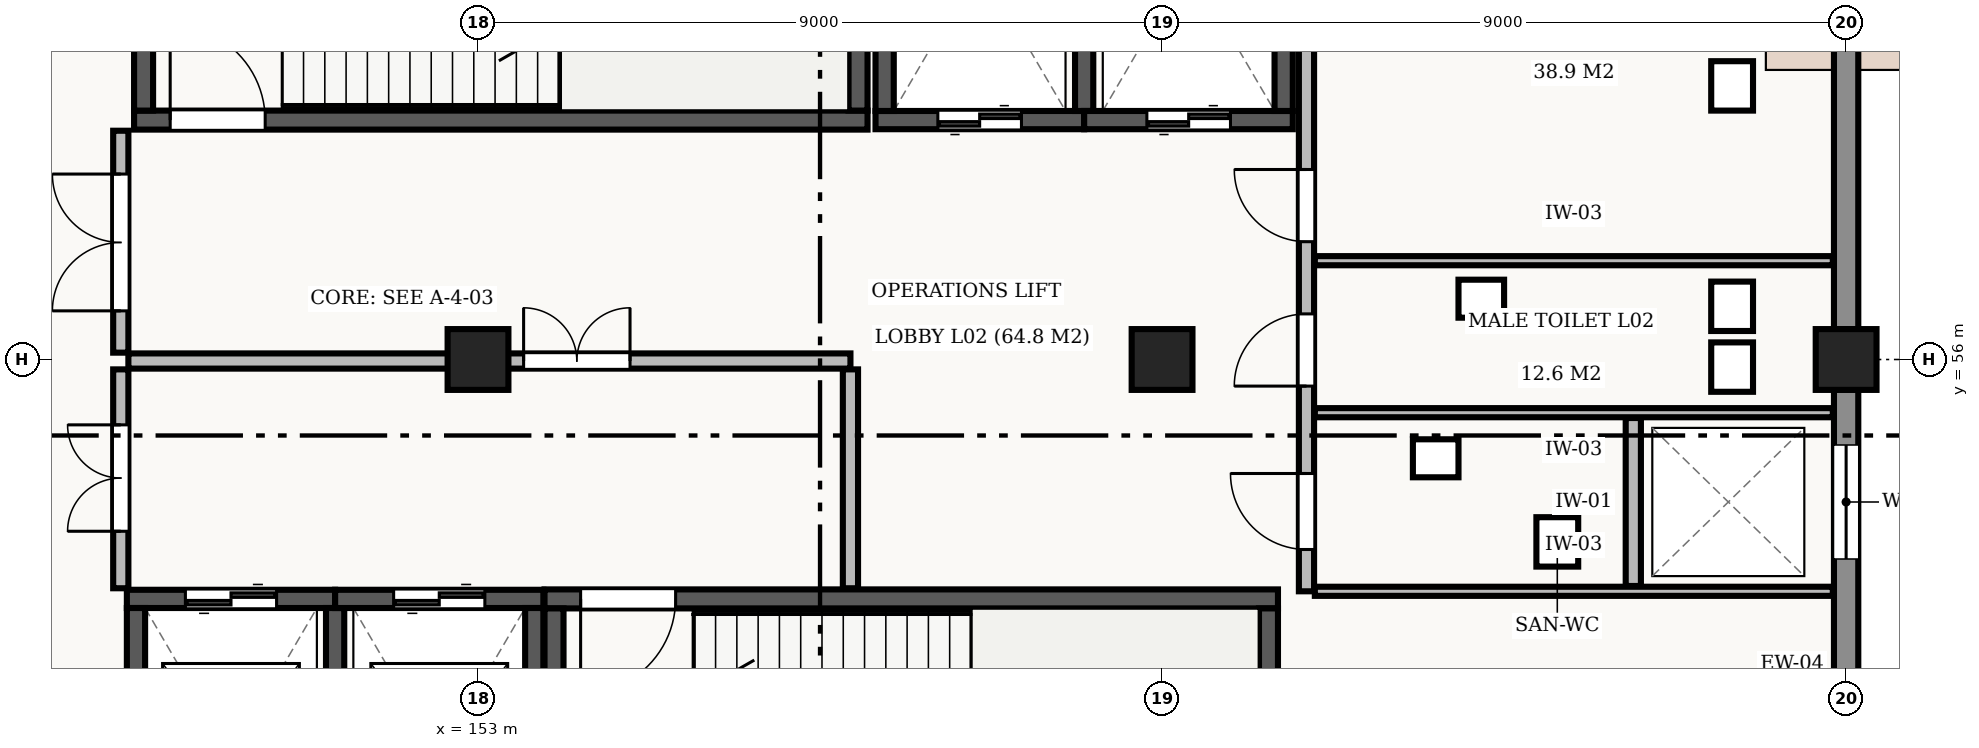
"""IFC4 building model, lengths in metres.
Left out: names, types, materials, properties, quantities, classifications, styles, units other than length and angle.
Written with IfcOpenShell. Run it as: python <this file> out.ifc"""

import sys

from ifc_helpers import new_model, si_unit, direction, frame, frame_2d, origin, origin_2d, place, context, subcontext, project, spatial, rectangle, extrude, element, fill, save


model = new_model("IFC4")
c1 = context("Model", 3, precision=1e-05, world=origin(), true_north=direction((0.0, 1.0)))
c2 = subcontext(c1, "Body", "Model", "MODEL_VIEW")
j1 = project(units=[si_unit("LENGTHUNIT", "METRE"), si_unit("PLANEANGLEUNIT", "RADIAN")], contexts=[c1])
p1 = place(None, origin())
s1 = spatial("IfcSite", under=j1, at=p1, CompositionType="ELEMENT")
p2 = place(p1, origin())
s2 = spatial("IfcBuilding", under=s1, at=p2, CompositionType="ELEMENT")
p3 = place(p2, frame((0.0, 0.0, 10.2)))
s3 = spatial("IfcBuildingStorey", under=s2, at=p3, CompositionType="ELEMENT", Elevation=10.2)
for number, where, z_axis, x_axis in (
    (1, (153.0, 56.0, 0.0), (0.0, 0.0, 1.0), (1.0, 0.0, 0.0)),
    (2, (162.0, 56.0, 0.0), (0.0, 0.0, 1.0), (1.0, 0.0, 0.0)),
    (3, (171.0, 56.0, 0.0), (0.0, 0.0, 1.0), (1.0, 0.0, 0.0)),
):
    element("IfcColumn", number, at=place(p3, frame(where, z_axis=z_axis, x_axis=x_axis)), inside=s3, PredefinedType="COLUMN", context=c2, shape_type="SweptSolid", body=[
        extrude(rectangle(XDim=0.8, YDim=0.8, at=origin_2d()), origin(), (0.0, 0.0, 1.0), 4.2),
    ])
p4 = place(p3, frame((171.0, 63.602, 0.0), z_axis=(0.0, 0.0, 1.0), x_axis=(0.0, -1.0, 0.0)))
e4 = element("IfcWall", 4, at=p4, inside=s3, PredefinedType="STANDARD", context=c2, shape_type="SweptSolid", body=[
    extrude(rectangle(XDim=7.204, YDim=0.32, at=frame_2d((3.602, 0.0))), origin(), (0.0, 0.0, 1.0), 3.32),
])
p5 = place(p4, frame((0.668, 0.0, 0.9)))
e5 = element("IfcOpeningElement", 5, at=p5, cuts=e4, PredefinedType="OPENING", context=c2, shape_type="SweptSolid", body=[
    extrude(rectangle(XDim=2.6, YDim=1.6, at=frame_2d((1.3, 0.8))), frame((0.0, 0.172, 0.0), z_axis=(0.0, -1.0, 0.0), x_axis=(1.0, 0.0, 0.0)), (0.0, 0.0, 1.0), 0.344),
])
p6 = place(p3, frame((171.0, 55.602, 0.0), z_axis=(0.0, 0.0, 1.0), x_axis=(0.0, -1.0, 0.0)))
e6 = element("IfcWall", 6, at=p6, inside=s3, PredefinedType="STANDARD", context=c2, shape_type="SweptSolid", body=[
    extrude(rectangle(XDim=7.204, YDim=0.32, at=frame_2d((3.602, 0.0))), origin(), (0.0, 0.0, 1.0), 3.32),
])
p7 = place(p6, frame((0.727, 0.0, 0.9)))
e7 = element("IfcOpeningElement", 7, at=p7, cuts=e6, PredefinedType="OPENING", context=c2, shape_type="SweptSolid", body=[
    extrude(rectangle(XDim=1.5, YDim=2.1, at=frame_2d((0.75, 1.05))), frame((0.0, 0.172, 0.0), z_axis=(0.0, -1.0, 0.0), x_axis=(1.0, 0.0, 0.0)), (0.0, 0.0, 1.0), 0.344),
])
p8 = place(p6, frame((4.303, 0.0, 0.9)))
e8 = element("IfcOpeningElement", 8, at=p8, cuts=e6, PredefinedType="OPENING", context=c2, shape_type="SweptSolid", body=[
    extrude(rectangle(XDim=1.5, YDim=2.1, at=frame_2d((0.75, 1.05))), frame((0.0, 0.172, 0.0), z_axis=(0.0, -1.0, 0.0), x_axis=(1.0, 0.0, 0.0)), (0.0, 0.0, 1.0), 0.344),
])
p9 = place(p3, frame((148.475, 59.15, 0.0), z_axis=(0.0, 0.0, 1.0), x_axis=(1.0, 0.0, 0.0)))
e9 = element("IfcWall", 9, at=p9, inside=s3, PredefinedType="SHEAR", context=c2, shape_type="SweptSolid", body=[
    extrude(rectangle(XDim=9.65, YDim=0.25, at=frame_2d((4.825, 0.0))), origin(), (0.0, 0.0, 1.0), 3.89),
])
p10 = place(p9, frame((0.475, 0.0, 0.0)))
e10 = element("IfcOpeningElement", 10, at=p10, cuts=e9, PredefinedType="OPENING", context=c2, shape_type="SweptSolid", body=[
    extrude(rectangle(XDim=1.25, YDim=2.15, at=frame_2d((0.625, 1.075))), frame((0.0, 0.137, 0.0), z_axis=(0.0, -1.0, 0.0), x_axis=(1.0, 0.0, 0.0)), (0.0, 0.0, 1.0), 0.274),
])
for number, where, z_axis, x_axis in (
    (11, (148.6, 63.125, 0.0), (0.0, 0.0, 1.0), (0.0, -1.0, 0.0)),
    (12, (158.0, 59.275, 0.0), (0.0, 0.0, 1.0), (0.0, 1.0, 0.0)),
):
    element("IfcWall", number, at=place(p3, frame(where, z_axis=z_axis, x_axis=x_axis)), inside=s3, PredefinedType="SHEAR", context=c2, shape_type="SweptSolid", body=[
        extrude(rectangle(XDim=3.85, YDim=0.25, at=frame_2d((1.925, 0.0))), origin(), (0.0, 0.0, 1.0), 3.89),
    ])
p11 = place(p3, frame((163.525, 52.85, 0.0), z_axis=(0.0, 0.0, 1.0), x_axis=(-1.0, 0.0, 0.0)))
e13 = element("IfcWall", 13, at=p11, inside=s3, PredefinedType="SHEAR", context=c2, shape_type="SweptSolid", body=[
    extrude(rectangle(XDim=9.65, YDim=0.25, at=frame_2d((4.825, 0.0))), origin(), (0.0, 0.0, 1.0), 3.89),
])
p12 = place(p11, frame((7.925, 0.0, 0.0)))
e14 = element("IfcOpeningElement", 14, at=p12, cuts=e13, PredefinedType="OPENING", context=c2, shape_type="SweptSolid", body=[
    extrude(rectangle(XDim=1.25, YDim=2.15, at=frame_2d((0.625, 1.075))), frame((0.0, 0.137, 0.0), z_axis=(0.0, -1.0, 0.0), x_axis=(1.0, 0.0, 0.0)), (0.0, 0.0, 1.0), 0.274),
])
for number, where, z_axis, x_axis in (
    (15, (154.0, 52.725, 0.0), (0.0, 0.0, 1.0), (0.0, -1.0, 0.0)),
    (16, (163.4, 48.875, 0.0), (0.0, 0.0, 1.0), (0.0, 1.0, 0.0)),
):
    element("IfcWall", number, at=place(p3, frame(where, z_axis=z_axis, x_axis=x_axis)), inside=s3, PredefinedType="SHEAR", context=c2, shape_type="SweptSolid", body=[
        extrude(rectangle(XDim=3.85, YDim=0.25, at=frame_2d((1.925, 0.0))), origin(), (0.0, 0.0, 1.0), 3.89),
    ])
p13 = place(p3, frame((158.23, 59.15, 0.0), z_axis=(0.0, 0.0, 1.0), x_axis=(1.0, 0.0, 0.0)))
e17 = element("IfcWall", 17, at=p13, inside=s3, PredefinedType="SHEAR", context=c2, shape_type="SweptSolid", body=[
    extrude(rectangle(XDim=2.745, YDim=0.24, at=frame_2d((1.373, 0.0))), origin(), (0.0, 0.0, 1.0), 3.89),
])
p14 = place(p13, frame((0.82, 0.0, 0.0)))
e18 = element("IfcOpeningElement", 18, at=p14, cuts=e17, PredefinedType="OPENING", context=c2, shape_type="SweptSolid", body=[
    extrude(rectangle(XDim=1.1, YDim=2.2, at=frame_2d((0.55, 1.1))), frame((0.0, 0.132, 0.0), z_axis=(0.0, -1.0, 0.0), x_axis=(1.0, 0.0, 0.0)), (0.0, 0.0, 1.0), 0.264),
])
for number, where, z_axis, x_axis in (
    (19, (158.35, 63.13, 0.0), (0.0, 0.0, 1.0), (0.0, -1.0, 0.0)),
    (20, (160.975, 59.27, 0.0), (0.0, 0.0, 1.0), (0.0, 1.0, 0.0)),
):
    element("IfcWall", number, at=place(p3, frame(where, z_axis=z_axis, x_axis=x_axis)), inside=s3, PredefinedType="SHEAR", context=c2, shape_type="SweptSolid", body=[
        extrude(rectangle(XDim=3.86, YDim=0.24, at=frame_2d((1.93, 0.0))), origin(), (0.0, 0.0, 1.0), 3.89),
    ])
p15 = place(p3, frame((160.975, 59.15, 0.0), z_axis=(0.0, 0.0, 1.0), x_axis=(1.0, 0.0, 0.0)))
e21 = element("IfcWall", 21, at=p15, inside=s3, PredefinedType="SHEAR", context=c2, shape_type="SweptSolid", body=[
    extrude(rectangle(XDim=2.745, YDim=0.24, at=frame_2d((1.373, 0.0))), origin(), (0.0, 0.0, 1.0), 3.89),
])
p16 = place(p15, frame((0.825, 0.0, 0.0)))
e22 = element("IfcOpeningElement", 22, at=p16, cuts=e21, PredefinedType="OPENING", context=c2, shape_type="SweptSolid", body=[
    extrude(rectangle(XDim=1.1, YDim=2.2, at=frame_2d((0.55, 1.1))), frame((0.0, 0.132, 0.0), z_axis=(0.0, -1.0, 0.0), x_axis=(1.0, 0.0, 0.0)), (0.0, 0.0, 1.0), 0.264),
])
p17 = place(p3, frame((163.6, 59.27, 0.0), z_axis=(0.0, 0.0, 1.0), x_axis=(0.0, 1.0, 0.0)))
e23 = element("IfcWall", 23, at=p17, inside=s3, PredefinedType="SHEAR", context=c2, shape_type="SweptSolid", body=[
    extrude(rectangle(XDim=3.86, YDim=0.24, at=frame_2d((1.93, 0.0))), origin(), (0.0, 0.0, 1.0), 3.89),
])
p18 = place(p3, frame((151.12, 52.85, 0.0), z_axis=(0.0, 0.0, 1.0), x_axis=(-1.0, 0.0, 0.0)))
e24 = element("IfcWall", 24, at=p18, inside=s3, PredefinedType="SHEAR", context=c2, shape_type="SweptSolid", body=[
    extrude(rectangle(XDim=2.74, YDim=0.24, at=frame_2d((1.37, 0.0))), origin(), (0.0, 0.0, 1.0), 3.89),
])
p19 = place(p18, frame((0.77, 0.0, 0.0)))
e25 = element("IfcOpeningElement", 25, at=p19, cuts=e24, PredefinedType="OPENING", context=c2, shape_type="SweptSolid", body=[
    extrude(rectangle(XDim=1.2, YDim=2.2, at=frame_2d((0.6, 1.1))), frame((0.0, 0.132, 0.0), z_axis=(0.0, -1.0, 0.0), x_axis=(1.0, 0.0, 0.0)), (0.0, 0.0, 1.0), 0.264),
])
for number, where, z_axis, x_axis in (
    (26, (148.5, 52.73, 0.0), (0.0, 0.0, 1.0), (0.0, -1.0, 0.0)),
    (27, (151.12, 48.87, 0.0), (0.0, 0.0, 1.0), (0.0, 1.0, 0.0)),
):
    element("IfcWall", number, at=place(p3, frame(where, z_axis=z_axis, x_axis=x_axis)), inside=s3, PredefinedType="SHEAR", context=c2, shape_type="SweptSolid", body=[
        extrude(rectangle(XDim=3.86, YDim=0.24, at=frame_2d((1.93, 0.0))), origin(), (0.0, 0.0, 1.0), 3.89),
    ])
p20 = place(p3, frame((153.86, 52.85, 0.0), z_axis=(0.0, 0.0, 1.0), x_axis=(-1.0, 0.0, 0.0)))
e28 = element("IfcWall", 28, at=p20, inside=s3, PredefinedType="SHEAR", context=c2, shape_type="SweptSolid", body=[
    extrude(rectangle(XDim=2.74, YDim=0.24, at=frame_2d((1.37, 0.0))), origin(), (0.0, 0.0, 1.0), 3.89),
])
p21 = place(p20, frame((0.77, 0.0, 0.0)))
e29 = element("IfcOpeningElement", 29, at=p21, cuts=e28, PredefinedType="OPENING", context=c2, shape_type="SweptSolid", body=[
    extrude(rectangle(XDim=1.2, YDim=2.2, at=frame_2d((0.6, 1.1))), frame((0.0, 0.132, 0.0), z_axis=(0.0, -1.0, 0.0), x_axis=(1.0, 0.0, 0.0)), (0.0, 0.0, 1.0), 0.264),
])
p22 = place(p3, frame((153.74, 48.87, 0.0), z_axis=(0.0, 0.0, 1.0), x_axis=(0.0, 1.0, 0.0)))
e30 = element("IfcWall", 30, at=p22, inside=s3, PredefinedType="SHEAR", context=c2, shape_type="SweptSolid", body=[
    extrude(rectangle(XDim=3.86, YDim=0.24, at=frame_2d((1.93, 0.0))), origin(), (0.0, 0.0, 1.0), 3.89),
])
p23 = place(p3, frame((148.4, 55.98, 0.0), z_axis=(0.0, 0.0, 1.0), x_axis=(1.0, 0.0, 0.0)))
e31 = element("IfcWall", 31, at=p23, inside=s3, PredefinedType="STANDARD", context=c2, shape_type="SweptSolid", body=[
    extrude(rectangle(XDim=9.5, YDim=0.2, at=frame_2d((4.75, 0.0))), origin(), (0.0, 0.0, 1.0), 3.27),
])
p24 = place(p23, frame((5.2, 0.0, 0.0)))
e32 = element("IfcOpeningElement", 32, at=p24, cuts=e31, PredefinedType="OPENING", context=c2, shape_type="SweptSolid", body=[
    extrude(rectangle(XDim=1.4, YDim=2.2, at=frame_2d((0.7, 1.1))), frame((0.0, 0.112, 0.0), z_axis=(0.0, -1.0, 0.0), x_axis=(1.0, 0.0, 0.0)), (0.0, 0.0, 1.0), 0.224),
])
p25 = place(p3, frame((157.9, 52.99, 0.0), z_axis=(0.0, 0.0, 1.0), x_axis=(0.0, 1.0, 0.0)))
e33 = element("IfcWall", 33, at=p25, inside=s3, PredefinedType="STANDARD", context=c2, shape_type="SweptSolid", body=[
    extrude(rectangle(XDim=2.88, YDim=0.2, at=frame_2d((1.44, 0.0))), origin(), (0.0, 0.0, 1.0), 3.89),
])
p26 = place(p3, frame((148.3, 52.99, 0.0), z_axis=(0.0, 0.0, 1.0), x_axis=(0.0, 1.0, 0.0)))
e34 = element("IfcWall", 34, at=p26, inside=s3, PredefinedType="STANDARD", context=c2, shape_type="SweptSolid", body=[
    extrude(rectangle(XDim=2.88, YDim=0.2, at=frame_2d((1.44, 0.0))), origin(), (0.0, 0.0, 1.0), 3.89),
])
p27 = place(p26, frame((0.75, 0.0, 0.0)))
e35 = element("IfcOpeningElement", 35, at=p27, cuts=e34, PredefinedType="OPENING", context=c2, shape_type="SweptSolid", body=[
    extrude(rectangle(XDim=1.4, YDim=2.2, at=frame_2d((0.7, 1.1))), frame((0.0, 0.112, 0.0), z_axis=(0.0, -1.0, 0.0), x_axis=(1.0, 0.0, 0.0)), (0.0, 0.0, 1.0), 0.224),
])
p28 = place(p3, frame((148.3, 56.09, 0.0), z_axis=(0.0, 0.0, 1.0), x_axis=(0.0, 1.0, 0.0)))
e36 = element("IfcWall", 36, at=p28, inside=s3, PredefinedType="STANDARD", context=c2, shape_type="SweptSolid", body=[
    extrude(rectangle(XDim=2.92, YDim=0.2, at=frame_2d((1.46, 0.0))), origin(), (0.0, 0.0, 1.0), 3.89),
])
p29 = place(p28, frame((0.55, 0.0, 0.0)))
e37 = element("IfcOpeningElement", 37, at=p29, cuts=e36, PredefinedType="OPENING", context=c2, shape_type="SweptSolid", body=[
    extrude(rectangle(XDim=1.8, YDim=2.2, at=frame_2d((0.9, 1.1))), frame((0.0, 0.112, 0.0), z_axis=(0.0, -1.0, 0.0), x_axis=(1.0, 0.0, 0.0)), (0.0, 0.0, 1.0), 0.224),
])
p30 = place(p3, frame((163.9, 52.95, 0.0), z_axis=(0.0, 0.0, 1.0), x_axis=(0.0, 1.0, 0.0)))
e38 = element("IfcWall", 38, at=p30, inside=s3, PredefinedType="STANDARD", context=c2, shape_type="SweptSolid", body=[
    extrude(rectangle(XDim=10.3, YDim=0.2, at=frame_2d((5.15, 0.0))), origin(), (0.0, 0.0, 1.0), 3.89),
])
p31 = place(p30, frame((0.55, 0.0, 0.0)))
e39 = element("IfcOpeningElement", 39, at=p31, cuts=e38, PredefinedType="OPENING", context=c2, shape_type="SweptSolid", body=[
    extrude(rectangle(XDim=1.0, YDim=2.1, at=frame_2d((0.5, 1.05))), frame((0.0, 0.112, 0.0), z_axis=(0.0, -1.0, 0.0), x_axis=(1.0, 0.0, 0.0)), (0.0, 0.0, 1.0), 0.224),
])
p32 = place(p30, frame((2.7, 0.0, 0.0)))
e40 = element("IfcOpeningElement", 40, at=p32, cuts=e38, PredefinedType="OPENING", context=c2, shape_type="SweptSolid", body=[
    extrude(rectangle(XDim=0.95, YDim=2.1, at=frame_2d((0.475, 1.05))), frame((0.0, 0.112, 0.0), z_axis=(0.0, -1.0, 0.0), x_axis=(1.0, 0.0, 0.0)), (0.0, 0.0, 1.0), 0.224),
])
p33 = place(p30, frame((4.6, 0.0, 0.0)))
e41 = element("IfcOpeningElement", 41, at=p33, cuts=e38, PredefinedType="OPENING", context=c2, shape_type="SweptSolid", body=[
    extrude(rectangle(XDim=0.95, YDim=2.1, at=frame_2d((0.475, 1.05))), frame((0.0, 0.112, 0.0), z_axis=(0.0, -1.0, 0.0), x_axis=(1.0, 0.0, 0.0)), (0.0, 0.0, 1.0), 0.224),
])
p34 = place(p3, frame((168.2, 53.02, 0.0), z_axis=(0.0, 0.0, 1.0), x_axis=(0.0, 1.0, 0.0)))
e42 = element("IfcWall", 42, at=p34, inside=s3, PredefinedType="STANDARD", context=c2, shape_type="SweptSolid", body=[
    extrude(rectangle(XDim=2.21, YDim=0.2, at=frame_2d((1.105, 0.0))), origin(), (0.0, 0.0, 1.0), 3.89),
])
for number, where, z_axis, x_axis in (
    (43, (164.01, 52.95, 0.0), (0.0, 0.0, 1.0), (1.0, 0.0, 0.0)),
    (44, (164.01, 55.3, 0.0), (0.0, 0.0, 1.0), (1.0, 0.0, 0.0)),
    (45, (164.01, 57.3, 0.0), (0.0, 0.0, 1.0), (1.0, 0.0, 0.0)),
):
    element("IfcWall", number, at=place(p3, frame(where, z_axis=z_axis, x_axis=x_axis)), inside=s3, PredefinedType="STANDARD", context=c2, shape_type="SweptSolid", body=[
        extrude(rectangle(XDim=6.815, YDim=0.12, at=frame_2d((3.407, 0.0))), origin(), (0.0, 0.0, 1.0), 3.89),
    ])
p35 = place(p7, origin())
e46 = element("IfcWindow", 46, at=p35, inside=s3, PartitioningType="SINGLE_PANEL", PredefinedType="WINDOW", context=c2, shape_type="SweptSolid", body=[
    extrude(rectangle(XDim=1.5, YDim=2.1, at=frame_2d((0.75, 1.05))), frame((0.0, 0.03, 0.0), z_axis=(0.0, -1.0, 0.0), x_axis=(1.0, 0.0, 0.0)), (0.0, 0.0, 1.0), 0.06),
])
fill(e7, e46)
p36 = place(p10, origin())
e47 = element("IfcDoor", 47, at=p36, inside=s3, OperationType="SINGLE_SWING_LEFT", PredefinedType="DOOR", context=c2, shape_type="SweptSolid", body=[
    extrude(rectangle(XDim=1.25, YDim=2.15, at=frame_2d((0.625, 1.075))), frame((0.0, 0.025, 0.0), z_axis=(0.0, -1.0, 0.0), x_axis=(1.0, 0.0, 0.0)), (0.0, 0.0, 1.0), 0.05),
])
fill(e10, e47)
p37 = place(p12, origin())
e48 = element("IfcDoor", 48, at=p37, inside=s3, OperationType="SINGLE_SWING_RIGHT", PredefinedType="DOOR", context=c2, shape_type="SweptSolid", body=[
    extrude(rectangle(XDim=1.25, YDim=2.15, at=frame_2d((0.625, 1.075))), frame((0.0, 0.025, 0.0), z_axis=(0.0, -1.0, 0.0), x_axis=(1.0, 0.0, 0.0)), (0.0, 0.0, 1.0), 0.05),
])
fill(e14, e48)
p38 = place(p14, origin())
e49 = element("IfcDoor", 49, at=p38, inside=s3, OperationType="DOUBLE_DOOR_SLIDING", PredefinedType="DOOR", context=c2, shape_type="SweptSolid", body=[
    extrude(rectangle(XDim=1.1, YDim=2.2, at=frame_2d((0.55, 1.1))), frame((0.0, 0.025, 0.0), z_axis=(0.0, -1.0, 0.0), x_axis=(1.0, 0.0, 0.0)), (0.0, 0.0, 1.0), 0.05),
])
fill(e18, e49)
p39 = place(p16, origin())
e50 = element("IfcDoor", 50, at=p39, inside=s3, OperationType="DOUBLE_DOOR_SLIDING", PredefinedType="DOOR", context=c2, shape_type="SweptSolid", body=[
    extrude(rectangle(XDim=1.1, YDim=2.2, at=frame_2d((0.55, 1.1))), frame((0.0, 0.025, 0.0), z_axis=(0.0, -1.0, 0.0), x_axis=(1.0, 0.0, 0.0)), (0.0, 0.0, 1.0), 0.05),
])
fill(e22, e50)
p40 = place(p19, origin())
e51 = element("IfcDoor", 51, at=p40, inside=s3, OperationType="DOUBLE_DOOR_SLIDING", PredefinedType="DOOR", context=c2, shape_type="SweptSolid", body=[
    extrude(rectangle(XDim=1.2, YDim=2.2, at=frame_2d((0.6, 1.1))), frame((0.0, 0.025, 0.0), z_axis=(0.0, -1.0, 0.0), x_axis=(1.0, 0.0, 0.0)), (0.0, 0.0, 1.0), 0.05),
])
fill(e25, e51)
p41 = place(p21, origin())
e52 = element("IfcDoor", 52, at=p41, inside=s3, OperationType="DOUBLE_DOOR_SLIDING", PredefinedType="DOOR", context=c2, shape_type="SweptSolid", body=[
    extrude(rectangle(XDim=1.2, YDim=2.2, at=frame_2d((0.6, 1.1))), frame((0.0, 0.025, 0.0), z_axis=(0.0, -1.0, 0.0), x_axis=(1.0, 0.0, 0.0)), (0.0, 0.0, 1.0), 0.05),
])
fill(e29, e52)
p42 = place(p24, origin())
e53 = element("IfcDoor", 53, at=p42, inside=s3, OperationType="DOUBLE_DOOR_SINGLE_SWING", PredefinedType="DOOR", context=c2, shape_type="SweptSolid", body=[
    extrude(rectangle(XDim=1.4, YDim=2.2, at=frame_2d((0.7, 1.1))), frame((0.0, 0.025, 0.0), z_axis=(0.0, -1.0, 0.0), x_axis=(1.0, 0.0, 0.0)), (0.0, 0.0, 1.0), 0.05),
])
fill(e32, e53)
p43 = place(p27, origin())
e54 = element("IfcDoor", 54, at=p43, inside=s3, OperationType="DOUBLE_DOOR_SINGLE_SWING", PredefinedType="DOOR", context=c2, shape_type="SweptSolid", body=[
    extrude(rectangle(XDim=1.4, YDim=2.2, at=frame_2d((0.7, 1.1))), frame((0.0, 0.025, 0.0), z_axis=(0.0, -1.0, 0.0), x_axis=(1.0, 0.0, 0.0)), (0.0, 0.0, 1.0), 0.05),
])
fill(e35, e54)
p44 = place(p29, origin())
e55 = element("IfcDoor", 55, at=p44, inside=s3, OperationType="DOUBLE_DOOR_SINGLE_SWING", PredefinedType="DOOR", context=c2, shape_type="SweptSolid", body=[
    extrude(rectangle(XDim=1.8, YDim=2.2, at=frame_2d((0.9, 1.1))), frame((0.0, 0.025, 0.0), z_axis=(0.0, -1.0, 0.0), x_axis=(1.0, 0.0, 0.0)), (0.0, 0.0, 1.0), 0.05),
])
fill(e37, e55)
p45 = place(p31, origin())
e56 = element("IfcDoor", 56, at=p45, inside=s3, OperationType="SINGLE_SWING_RIGHT", PredefinedType="DOOR", context=c2, shape_type="SweptSolid", body=[
    extrude(rectangle(XDim=1.0, YDim=2.1, at=frame_2d((0.5, 1.05))), frame((0.0, 0.025, 0.0), z_axis=(0.0, -1.0, 0.0), x_axis=(1.0, 0.0, 0.0)), (0.0, 0.0, 1.0), 0.05),
])
fill(e39, e56)
p46 = place(p32, origin())
e57 = element("IfcDoor", 57, at=p46, inside=s3, OperationType="SINGLE_SWING_LEFT", PredefinedType="DOOR", context=c2, shape_type="SweptSolid", body=[
    extrude(rectangle(XDim=0.95, YDim=2.1, at=frame_2d((0.475, 1.05))), frame((0.0, 0.025, 0.0), z_axis=(0.0, -1.0, 0.0), x_axis=(1.0, 0.0, 0.0)), (0.0, 0.0, 1.0), 0.05),
])
fill(e40, e57)
p47 = place(p33, origin())
e58 = element("IfcDoor", 58, at=p47, inside=s3, OperationType="SINGLE_SWING_RIGHT", PredefinedType="DOOR", context=c2, shape_type="SweptSolid", body=[
    extrude(rectangle(XDim=0.95, YDim=2.1, at=frame_2d((0.475, 1.05))), frame((0.0, 0.025, 0.0), z_axis=(0.0, -1.0, 0.0), x_axis=(1.0, 0.0, 0.0)), (0.0, 0.0, 1.0), 0.05),
])
fill(e41, e58)
save(model, sys.argv[1])
